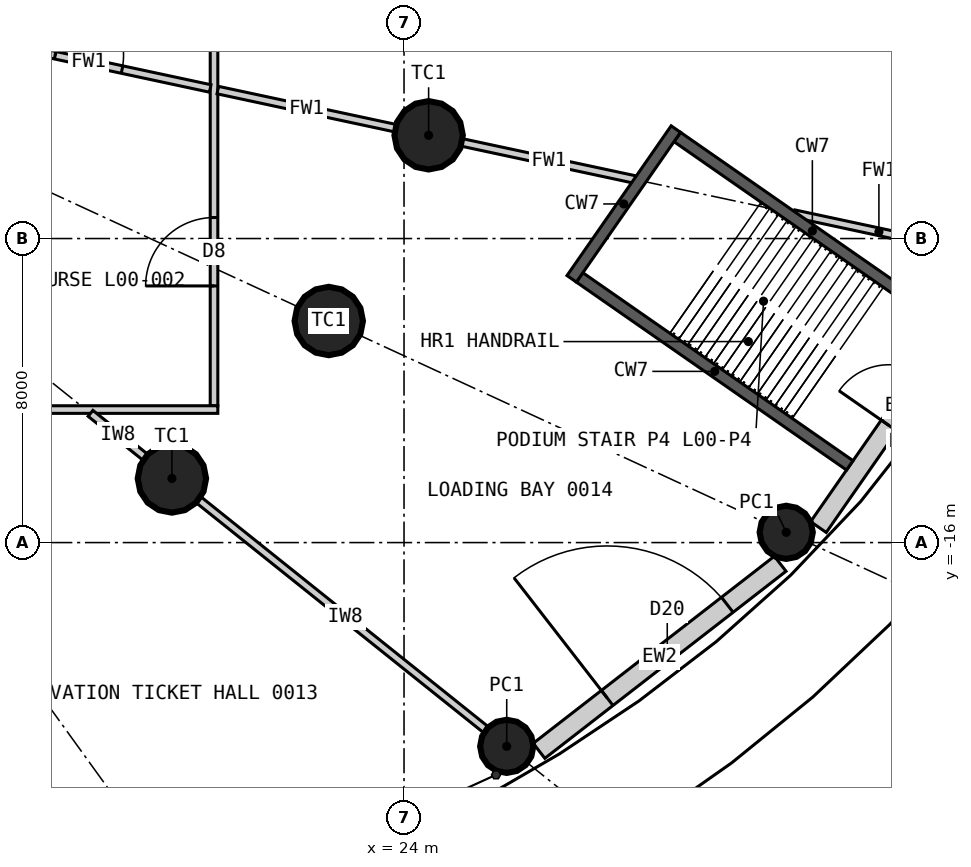
"""IFC4 building model, lengths in metres.
Left out: names, types, materials, properties, quantities, classifications, styles, units other than length and angle.
Written with IfcOpenShell. Run it as: python <this file> out.ifc"""

import sys

from ifc_helpers import new_model, si_unit, direction, frame, frame_2d, origin, origin_2d, place, context, subcontext, project, spatial, rectangle, circle, extrude, element, fill, save


model = new_model("IFC4")
c1 = context("Model", 3, precision=1e-05, world=origin(), true_north=direction((0.0, 1.0)))
c2 = subcontext(c1, "Body", "Model", "MODEL_VIEW")
j1 = project(units=[si_unit("LENGTHUNIT", "METRE"), si_unit("PLANEANGLEUNIT", "RADIAN")], contexts=[c1])
p1 = place(None, origin())
s1 = spatial("IfcSite", under=j1, at=p1, CompositionType="ELEMENT")
p2 = place(p1, origin())
s2 = spatial("IfcBuilding", under=s1, at=p2, CompositionType="ELEMENT")
p3 = place(p2, origin())
s3 = spatial("IfcBuildingStorey", under=s2, at=p3, CompositionType="ELEMENT", Elevation=0.0)
for number, where, z_axis, x_axis in (
    (1, (17.892, -14.313, 0.0), (0.0, 0.0, 1.0), (1.0, 0.0, 0.0)),
    (2, (22.019, -10.17, 0.0), (0.0, 0.0, 1.0), (1.0, 0.0, 0.0)),
    (3, (24.647, -5.283, 0.0), (0.0, 0.0, 1.0), (1.0, 0.0, 0.0)),
):
    element("IfcColumn", number, at=place(p3, frame(where, z_axis=z_axis, x_axis=x_axis)), inside=s3, PredefinedType="COLUMN", context=c2, shape_type="SweptSolid", body=[
        extrude(circle(Radius=0.9, at=origin_2d()), origin(), (0.0, 0.0, 1.0), 7.2),
    ])
for number, where, z_axis, x_axis in (
    (4, (26.702, -21.362, 0.0), (0.0, 0.0, 1.0), (1.0, 0.0, 0.0)),
    (5, (34.057, -15.73, 0.0), (0.0, 0.0, 1.0), (1.0, 0.0, 0.0)),
):
    element("IfcColumn", number, at=place(p3, frame(where, z_axis=z_axis, x_axis=x_axis)), inside=s3, PredefinedType="COLUMN", context=c2, shape_type="SweptSolid", body=[
        extrude(circle(Radius=0.7, at=origin_2d()), origin(), (0.0, 0.0, 1.0), 7.2),
    ])
p4 = place(p3, frame((27.552, -21.48, 0.0), z_axis=(0.0, 0.0, 1.0), x_axis=(0.790125764434, 0.612944758014, 0.0)))
e6 = element("IfcWall", 6, at=p4, inside=s3, PredefinedType="SOLIDWALL", context=c2, shape_type="SweptSolid", body=[
    extrude(rectangle(XDim=8.032, YDim=0.5, at=frame_2d((4.016, 0.0))), origin(), (0.0, 0.0, 1.0), 6.95),
])
p5 = place(p4, frame((2.27, 0.0, 0.0)))
e7 = element("IfcOpeningElement", 7, at=p5, cuts=e6, PredefinedType="OPENING", context=c2, shape_type="SweptSolid", body=[
    extrude(rectangle(XDim=4.0, YDim=4.5, at=frame_2d((2.0, 2.25))), frame((0.0, 0.26, 0.0), z_axis=(0.0, -1.0, 0.0), x_axis=(1.0, 0.0, 0.0)), (0.0, 0.0, 1.0), 0.52),
])
p6 = place(p3, frame((34.905, -15.592, 0.0), z_axis=(0.0, 0.0, 1.0), x_axis=(0.571029335057, 0.820929655028, 0.0)))
e8 = element("IfcWall", 8, at=p6, inside=s3, PredefinedType="SOLIDWALL", context=c2, shape_type="SweptSolid", body=[
    extrude(rectangle(XDim=7.733, YDim=0.5, at=frame_2d((3.866, 0.0))), origin(), (0.0, 0.0, 1.0), 6.95),
])
p7 = place(p6, frame((3.254, 0.0, 0.0)))
e9 = element("IfcOpeningElement", 9, at=p7, cuts=e8, PredefinedType="OPENING", context=c2, shape_type="SweptSolid", body=[
    extrude(rectangle(XDim=1.6, YDim=2.1, at=frame_2d((0.8, 1.05))), frame((0.0, 0.26, 0.0), z_axis=(0.0, -1.0, 0.0), x_axis=(1.0, 0.0, 0.0)), (0.0, 0.0, 1.0), 0.52),
])
p8 = place(p3, frame((19.0, -12.4, 0.0), z_axis=(0.0, 0.0, 1.0), x_axis=(0.0, 1.0, 0.0)))
e10 = element("IfcWall", 10, at=p8, inside=s3, PredefinedType="PARTITIONING", context=c2, shape_type="SweptSolid", body=[
    extrude(rectangle(XDim=24.8, YDim=0.2, at=frame_2d((12.4, 0.0))), origin(), (0.0, 0.0, 1.0), 6.95),
])
p9 = place(p8, frame((11.2, 0.0, 0.0)))
e11 = element("IfcOpeningElement", 11, at=p9, cuts=e10, PredefinedType="OPENING", context=c2, shape_type="SweptSolid", body=[
    extrude(rectangle(XDim=2.4, YDim=3.0, at=frame_2d((1.2, 1.5))), frame((0.0, 0.11, 0.0), z_axis=(0.0, -1.0, 0.0), x_axis=(1.0, 0.0, 0.0)), (0.0, 0.0, 1.0), 0.22),
])
p10 = place(p8, frame((3.153, 0.0, 0.0)))
e12 = element("IfcOpeningElement", 12, at=p10, cuts=e10, PredefinedType="OPENING", context=c2, shape_type="SweptSolid", body=[
    extrude(rectangle(XDim=1.8, YDim=2.4, at=frame_2d((0.9, 1.2))), frame((0.0, 0.11, 0.0), z_axis=(0.0, -1.0, 0.0), x_axis=(1.0, 0.0, 0.0)), (0.0, 0.0, 1.0), 0.22),
])
p11 = place(p8, frame((17.094, 0.0, 0.0)))
e13 = element("IfcOpeningElement", 13, at=p11, cuts=e10, PredefinedType="OPENING", context=c2, shape_type="SweptSolid", body=[
    extrude(rectangle(XDim=1.8, YDim=2.4, at=frame_2d((0.9, 1.2))), frame((0.0, 0.11, 0.0), z_axis=(0.0, -1.0, 0.0), x_axis=(1.0, 0.0, 0.0)), (0.0, 0.0, 1.0), 0.22),
])
p12 = place(p3, frame((19.1, -12.5, 0.0), z_axis=(0.0, 0.0, 1.0), x_axis=(-1.0, 0.0, 0.0)))
e14 = element("IfcWall", 14, at=p12, inside=s3, PredefinedType="PARTITIONING", context=c2, shape_type="SweptSolid", body=[
    extrude(rectangle(XDim=38.2, YDim=0.2, at=frame_2d((19.1, 0.0))), origin(), (0.0, 0.0, 1.0), 6.95),
])
p13 = place(p12, frame((31.997, 0.0, 0.0)))
e15 = element("IfcOpeningElement", 15, at=p13, cuts=e14, PredefinedType="OPENING", context=c2, shape_type="SweptSolid", body=[
    extrude(rectangle(XDim=2.4, YDim=3.0, at=frame_2d((1.2, 1.5))), frame((0.0, 0.11, 0.0), z_axis=(0.0, -1.0, 0.0), x_axis=(1.0, 0.0, 0.0)), (0.0, 0.0, 1.0), 0.22),
])
p14 = place(p12, frame((25.257, 0.0, 0.0)))
e16 = element("IfcOpeningElement", 16, at=p14, cuts=e14, PredefinedType="OPENING", context=c2, shape_type="SweptSolid", body=[
    extrude(rectangle(XDim=1.0, YDim=2.2, at=frame_2d((0.5, 1.1))), frame((0.0, 0.11, 0.0), z_axis=(0.0, -1.0, 0.0), x_axis=(1.0, 0.0, 0.0)), (0.0, 0.0, 1.0), 0.22),
])
p15 = place(p12, frame((17.9, 0.0, 0.0)))
e17 = element("IfcOpeningElement", 17, at=p15, cuts=e14, PredefinedType="OPENING", context=c2, shape_type="SweptSolid", body=[
    extrude(rectangle(XDim=2.4, YDim=3.0, at=frame_2d((1.2, 1.5))), frame((0.0, 0.11, 0.0), z_axis=(0.0, -1.0, 0.0), x_axis=(1.0, 0.0, 0.0)), (0.0, 0.0, 1.0), 0.22),
])
p16 = place(p12, frame((7.915, 0.0, 0.0)))
e18 = element("IfcOpeningElement", 18, at=p16, cuts=e14, PredefinedType="OPENING", context=c2, shape_type="SweptSolid", body=[
    extrude(rectangle(XDim=2.4, YDim=3.0, at=frame_2d((1.2, 1.5))), frame((0.0, 0.11, 0.0), z_axis=(0.0, -1.0, 0.0), x_axis=(1.0, 0.0, 0.0)), (0.0, 0.0, 1.0), 0.22),
])
p17 = place(p3, frame((15.75, -12.6, 0.0), z_axis=(0.0, 0.0, 1.0), x_axis=(0.780881734892, -0.6246788904, 0.0)))
e19 = element("IfcWall", 19, at=p17, inside=s3, PredefinedType="PARTITIONING", context=c2, shape_type="SweptSolid", body=[
    extrude(rectangle(XDim=1.843, YDim=0.2, at=frame_2d((0.921, 0.0))), origin(), (0.0, 0.0, 1.0), 6.1),
])
p18 = place(p3, frame((18.594, -14.875, 0.0), z_axis=(0.0, 0.0, 1.0), x_axis=(0.780868809443, -0.624695047554, 0.0)))
e20 = element("IfcWall", 20, at=p18, inside=s3, PredefinedType="PARTITIONING", context=c2, shape_type="SweptSolid", body=[
    extrude(rectangle(XDim=9.883, YDim=0.2, at=frame_2d((4.941, 0.0))), origin(), (0.0, 0.0, 1.0), 6.05),
])
p19 = place(p3, frame((19.1, -4.094, 0.0), z_axis=(0.0, 0.0, 1.0), x_axis=(0.977784445586, -0.209612924148, 0.0)))
e21 = element("IfcWall", 21, at=p19, inside=s3, PredefinedType="PARTITIONING", context=c2, shape_type="SweptSolid", body=[
    extrude(rectangle(XDim=4.773, YDim=0.2, at=frame_2d((2.386, 0.0))), origin(), (0.0, 0.0, 1.0), 6.1),
])
p20 = place(p3, frame((25.527, -5.472, 0.0), z_axis=(0.0, 0.0, 1.0), x_axis=(0.977787143577, -0.209600338396, 0.0)))
e22 = element("IfcWall", 22, at=p20, inside=s3, PredefinedType="PARTITIONING", context=c2, shape_type="SweptSolid", body=[
    extrude(rectangle(XDim=4.68, YDim=0.2, at=frame_2d((2.34, 0.0))), origin(), (0.0, 0.0, 1.0), 6.05),
])
p21 = place(p3, frame((34.263, -7.345, 0.0), z_axis=(0.0, 0.0, 1.0), x_axis=(0.977794589892, -0.209565598271, 0.0)))
e23 = element("IfcWall", 23, at=p21, inside=s3, PredefinedType="PARTITIONING", context=c2, shape_type="SweptSolid", body=[
    extrude(rectangle(XDim=4.567, YDim=0.2, at=frame_2d((2.283, 0.0))), origin(), (0.0, 0.0, 1.0), 6.05),
])
p22 = place(p3, frame((35.729, -13.968, 0.0), z_axis=(0.0, 0.0, 1.0), x_axis=(-0.82092761123, 0.571032273274, 0.0)))
e24 = element("IfcWall", 24, at=p22, inside=s3, PredefinedType="SHEAR", context=c2, shape_type="SweptSolid", body=[
    extrude(rectangle(XDim=8.66, YDim=0.3, at=frame_2d((4.33, 0.0))), origin(), (0.0, 0.0, 1.0), 7.2),
])
p23 = place(p3, frame((38.299, -10.274, 0.0), z_axis=(0.0, 0.0, 1.0), x_axis=(-0.820936803751, 0.571019057692, 0.0)))
e25 = element("IfcWall", 25, at=p23, inside=s3, PredefinedType="SHEAR", context=c2, shape_type="SweptSolid", body=[
    extrude(rectangle(XDim=8.66, YDim=0.3, at=frame_2d((4.33, 0.0))), origin(), (0.0, 0.0, 1.0), 7.2),
])
p24 = place(p3, frame((28.412, -9.06, 0.0), z_axis=(0.0, 0.0, 1.0), x_axis=(0.571036173178, 0.820924898467, 0.0)))
e26 = element("IfcWall", 26, at=p24, inside=s3, PredefinedType="SHEAR", context=c2, shape_type="SweptSolid", body=[
    extrude(rectangle(XDim=4.8, YDim=0.3, at=frame_2d((2.4, 0.0))), origin(), (0.0, 0.0, 1.0), 7.2),
])
p25 = place(p3, frame((18.9, -4.052, 0.0), z_axis=(0.0, 0.0, 1.0), x_axis=(-0.977781666858, 0.2096258857, 0.0)))
e27 = element("IfcWall", 27, at=p25, inside=s3, PredefinedType="PARTITIONING", context=c2, shape_type="SweptSolid", body=[
    extrude(rectangle(XDim=6.545, YDim=0.2, at=frame_2d((3.273, 0.0))), origin(), (0.0, 0.0, 1.0), 6.95),
])
p26 = place(p25, frame((2.373, 0.0, 0.0)))
e28 = element("IfcOpeningElement", 28, at=p26, cuts=e27, PredefinedType="OPENING", context=c2, shape_type="SweptSolid", body=[
    extrude(rectangle(XDim=1.8, YDim=2.4, at=frame_2d((0.9, 1.2))), frame((0.0, 0.11, 0.0), z_axis=(0.0, -1.0, 0.0), x_axis=(1.0, 0.0, 0.0)), (0.0, 0.0, 1.0), 0.22),
])
p27 = place(p5, origin())
e29 = element("IfcDoor", 29, at=p27, inside=s3, OperationType="ROLLINGUP", PredefinedType="DOOR", context=c2, shape_type="SweptSolid", body=[
    extrude(rectangle(XDim=4.0, YDim=4.5, at=frame_2d((2.0, 2.25))), frame((0.0, 0.025, 0.0), z_axis=(0.0, -1.0, 0.0), x_axis=(1.0, 0.0, 0.0)), (0.0, 0.0, 1.0), 0.05),
])
fill(e7, e29)
p28 = place(p7, origin())
e30 = element("IfcDoor", 30, at=p28, inside=s3, OperationType="DOUBLE_DOOR_DOUBLE_SWING", PredefinedType="DOOR", context=c2, shape_type="SweptSolid", body=[
    extrude(rectangle(XDim=1.6, YDim=2.1, at=frame_2d((0.8, 1.05))), frame((0.0, 0.025, 0.0), z_axis=(0.0, -1.0, 0.0), x_axis=(1.0, 0.0, 0.0)), (0.0, 0.0, 1.0), 0.05),
])
fill(e9, e30)
p29 = place(p10, origin())
e31 = element("IfcDoor", 31, at=p29, inside=s3, OperationType="DOUBLE_DOOR_DOUBLE_SWING", PredefinedType="DOOR", context=c2, shape_type="SweptSolid", body=[
    extrude(rectangle(XDim=1.8, YDim=2.4, at=frame_2d((0.9, 1.2))), frame((0.0, 0.025, 0.0), z_axis=(0.0, -1.0, 0.0), x_axis=(1.0, 0.0, 0.0)), (0.0, 0.0, 1.0), 0.05),
])
fill(e12, e31)
p30 = place(p26, origin())
e32 = element("IfcDoor", 32, at=p30, inside=s3, OperationType="DOUBLE_DOOR_DOUBLE_SWING", PredefinedType="DOOR", context=c2, shape_type="SweptSolid", body=[
    extrude(rectangle(XDim=1.8, YDim=2.4, at=frame_2d((0.9, 1.2))), frame((0.0, 0.025, 0.0), z_axis=(0.0, -1.0, 0.0), x_axis=(1.0, 0.0, 0.0)), (0.0, 0.0, 1.0), 0.05),
])
fill(e28, e32)
save(model, sys.argv[1])
